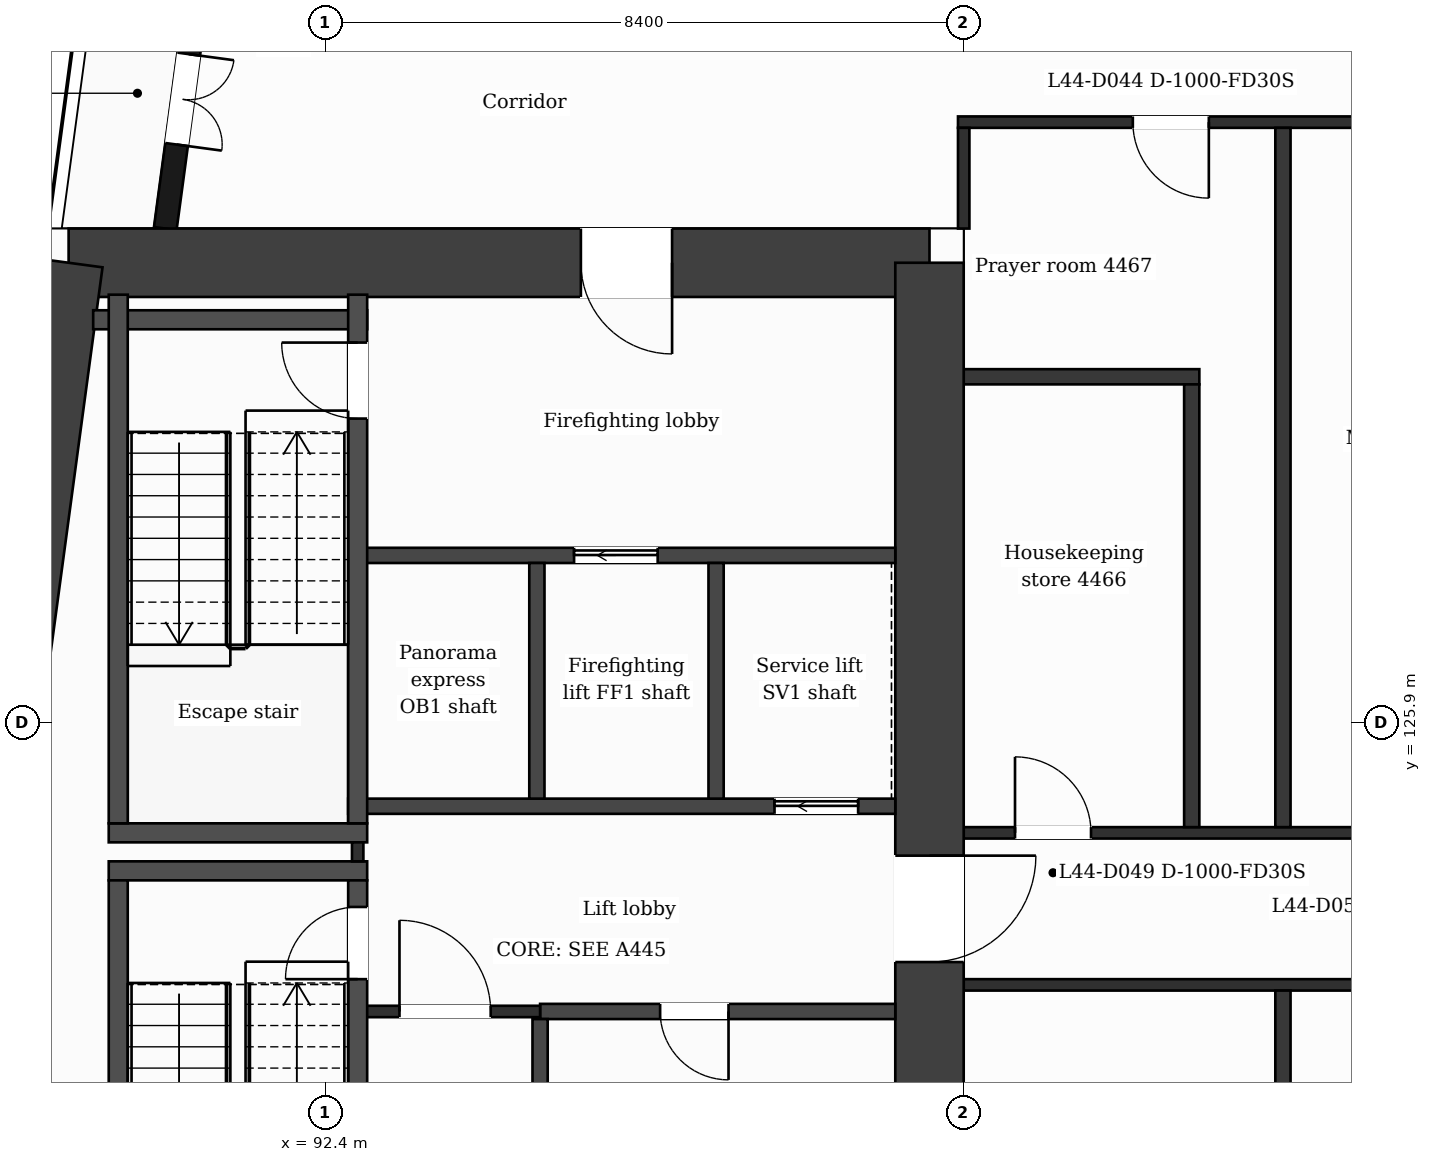
"""IFC4 building model, lengths in metres.
Left out: names, types, materials, properties, quantities, classifications, styles, units other than length and angle.
Written with IfcOpenShell. Run it as: python <this file> out.ifc"""

import sys

from ifc_helpers import new_model, si_unit, direction, frame, frame_2d, origin, place, context, subcontext, project, spatial, rectangle, extrude, element, fill, save


model = new_model("IFC4")
c1 = context("Model", 3, precision=1e-05, world=origin(), true_north=direction((0.0, 1.0)))
c2 = subcontext(c1, "Body", "Model", "MODEL_VIEW")
j1 = project(units=[si_unit("LENGTHUNIT", "METRE"), si_unit("PLANEANGLEUNIT", "RADIAN")], contexts=[c1])
p1 = place(None, origin())
s1 = spatial("IfcSite", under=j1, at=p1, CompositionType="ELEMENT")
p2 = place(p1, origin())
s2 = spatial("IfcBuilding", under=s1, at=p2, CompositionType="ELEMENT")
p3 = place(p2, frame((0.0, 0.0, 184.8)))
s3 = spatial("IfcBuildingStorey", under=s2, at=p3, CompositionType="ELEMENT", Elevation=184.8)
p4 = place(p3, frame((89.024, 131.95, 0.0), z_axis=(0.0, 0.0, 1.0), x_axis=(1.0, 0.0, 0.0)))
e1 = element("IfcWall", 1, at=p4, inside=s3, PredefinedType="SHEAR", context=c2, shape_type="SweptSolid", body=[
    extrude(rectangle(XDim=11.326, YDim=0.9, at=frame_2d((5.663, 0.0))), origin(), (0.0, 0.0, 1.0), 3.7),
])
p5 = place(p4, frame((6.739, 0.0, 0.0)))
e2 = element("IfcOpeningElement", 2, at=p5, cuts=e1, PredefinedType="OPENING", context=c2, shape_type="SweptSolid", body=[
    extrude(rectangle(XDim=1.2, YDim=2.1, at=frame_2d((0.6, 1.05))), frame((0.0, 0.46, 0.0), z_axis=(0.0, -1.0, 0.0), x_axis=(1.0, 0.0, 0.0)), (0.0, 0.0, 1.0), 0.92),
])
p6 = place(p3, frame((100.35, 131.95, 0.0), z_axis=(0.0, 0.0, 1.0), x_axis=(0.0, -1.0, 0.0)))
e3 = element("IfcWall", 3, at=p6, inside=s3, PredefinedType="SHEAR", context=c2, shape_type="SweptSolid", body=[
    extrude(rectangle(XDim=21.1, YDim=0.9, at=frame_2d((10.55, 0.0))), origin(), (0.0, 0.0, 1.0), 3.7),
])
p7 = place(p6, frame((7.8, 0.0, 0.0)))
e4 = element("IfcOpeningElement", 4, at=p7, cuts=e3, PredefinedType="OPENING", context=c2, shape_type="SweptSolid", body=[
    extrude(rectangle(XDim=1.4, YDim=2.1, at=frame_2d((0.7, 1.05))), frame((0.0, 0.46, 0.0), z_axis=(0.0, -1.0, 0.0), x_axis=(1.0, 0.0, 0.0)), (0.0, 0.0, 1.0), 0.92),
])
p8 = place(p3, frame((86.184, 110.85, 0.0), z_axis=(0.0, 0.0, 1.0), x_axis=(0.133410495943, 0.991060865725, 0.0)))
e5 = element("IfcWall", 5, at=p8, inside=s3, PredefinedType="SHEAR", context=c2, shape_type="SweptSolid", body=[
    extrude(rectangle(XDim=21.29, YDim=0.9, at=frame_2d((10.645, 0.0))), origin(), (0.0, 0.0, 1.0), 3.7),
])
p9 = place(p3, frame((91.177, 138.95, 0.0), z_axis=(0.0, 0.0, 1.0), x_axis=(-0.133426664613, -0.991058689065, 0.0)))
e6 = element("IfcWall", 6, at=p9, inside=s3, PredefinedType="SOLIDWALL", context=c2, shape_type="SweptSolid", body=[
    extrude(rectangle(XDim=6.609, YDim=0.3, at=frame_2d((3.305, 0.0))), origin(), (0.0, 0.0, 1.0), 3.38),
])
p10 = place(p9, frame((1.039, 0.0, 0.9)))
e7 = element("IfcOpeningElement", 7, at=p10, cuts=e6, PredefinedType="OPENING", context=c2, shape_type="SweptSolid", body=[
    extrude(rectangle(XDim=1.2, YDim=2.1, at=frame_2d((0.6, 1.05))), frame((0.0, 0.16, 0.0), z_axis=(0.0, -1.0, 0.0), x_axis=(1.0, 0.0, 0.0)), (0.0, 0.0, 1.0), 0.32),
])
p11 = place(p9, frame((4.294, 0.0, 0.0)))
e8 = element("IfcOpeningElement", 8, at=p11, cuts=e6, PredefinedType="OPENING", context=c2, shape_type="SweptSolid", body=[
    extrude(rectangle(XDim=1.2, YDim=2.4, at=frame_2d((0.6, 1.2))), frame((0.0, 0.16, 0.0), z_axis=(0.0, -1.0, 0.0), x_axis=(1.0, 0.0, 0.0)), (0.0, 0.0, 1.0), 0.32),
])
p12 = place(p3, frame((95.227, 122.1, 0.0), z_axis=(0.0, 0.0, 1.0), x_axis=(1.0, 0.0, 0.0)))
e9 = element("IfcWall", 9, at=p12, inside=s3, PredefinedType="PARTITIONING", context=c2, shape_type="SweptSolid", body=[
    extrude(rectangle(XDim=4.673, YDim=0.2, at=frame_2d((2.336, 0.0))), origin(), (0.0, 0.0, 1.0), 3.38),
])
p13 = place(p12, frame((1.579, 0.0, 0.0)))
e10 = element("IfcOpeningElement", 10, at=p13, cuts=e9, PredefinedType="OPENING", context=c2, shape_type="SweptSolid", body=[
    extrude(rectangle(XDim=0.9, YDim=2.1, at=frame_2d((0.45, 1.05))), frame((0.0, 0.11, 0.0), z_axis=(0.0, -1.0, 0.0), x_axis=(1.0, 0.0, 0.0)), (0.0, 0.0, 1.0), 0.22),
])
p14 = place(p3, frame((92.827, 122.1, 0.0), z_axis=(0.0, 0.0, 1.0), x_axis=(1.0, 0.0, 0.0)))
e11 = element("IfcWall", 11, at=p14, inside=s3, PredefinedType="PARTITIONING", context=c2, shape_type="SweptSolid", body=[
    extrude(rectangle(XDim=2.4, YDim=0.15, at=frame_2d((1.2, 0.0))), origin(), (0.0, 0.0, 1.0), 3.38),
])
p15 = place(p14, frame((0.55, 0.0, 0.0)))
e12 = element("IfcOpeningElement", 12, at=p15, cuts=e11, PredefinedType="OPENING", context=c2, shape_type="SweptSolid", body=[
    extrude(rectangle(XDim=1.2, YDim=2.1, at=frame_2d((0.6, 1.05))), frame((0.0, 0.085, 0.0), z_axis=(0.0, -1.0, 0.0), x_axis=(1.0, 0.0, 0.0)), (0.0, 0.0, 1.0), 0.17),
])
p16 = place(p3, frame((100.8, 122.45, 0.0), z_axis=(0.0, 0.0, 1.0), x_axis=(1.0, 0.0, 0.0)))
e13 = element("IfcWall", 13, at=p16, inside=s3, PredefinedType="PARTITIONING", context=c2, shape_type="SweptSolid", body=[
    extrude(rectangle(XDim=25.2, YDim=0.15, at=frame_2d((12.6, 0.0))), origin(), (0.0, 0.0, 1.0), 3.38),
])
for number, where, z_axis, x_axis in (
    (14, (89.552, 123.95, 0.0), (0.0, 0.0, 1.0), (1.0, 0.0, 0.0)),
    (15, (89.552, 124.45, 0.0), (0.0, 0.0, 1.0), (1.0, 0.0, 0.0)),
):
    element("IfcWall", number, at=place(p3, frame(where, z_axis=z_axis, x_axis=x_axis)), inside=s3, PredefinedType="PARTITIONING", context=c2, shape_type="SweptSolid", body=[
        extrude(rectangle(XDim=3.4, YDim=0.25, at=frame_2d((1.7, 0.0))), origin(), (0.0, 0.0, 1.0), 3.38),
    ])
p17 = place(p3, frame((100.8, 124.45, 0.0), z_axis=(0.0, 0.0, 1.0), x_axis=(1.0, 0.0, 0.0)))
e16 = element("IfcWall", 16, at=p17, inside=s3, PredefinedType="PARTITIONING", context=c2, shape_type="SweptSolid", body=[
    extrude(rectangle(XDim=25.2, YDim=0.15, at=frame_2d((12.6, 0.0))), origin(), (0.0, 0.0, 1.0), 3.38),
])
p18 = place(p17, frame((0.675, 0.0, 0.0)))
e17 = element("IfcOpeningElement", 17, at=p18, cuts=e16, PredefinedType="OPENING", context=c2, shape_type="SweptSolid", body=[
    extrude(rectangle(XDim=1.0, YDim=2.1, at=frame_2d((0.5, 1.05))), frame((0.0, 0.085, 0.0), z_axis=(0.0, -1.0, 0.0), x_axis=(1.0, 0.0, 0.0)), (0.0, 0.0, 1.0), 0.17),
])
p19 = place(p17, frame((5.175, 0.0, 0.0)))
e18 = element("IfcOpeningElement", 18, at=p19, cuts=e16, PredefinedType="OPENING", context=c2, shape_type="SweptSolid", body=[
    extrude(rectangle(XDim=1.0, YDim=2.1, at=frame_2d((0.5, 1.05))), frame((0.0, 0.085, 0.0), z_axis=(0.0, -1.0, 0.0), x_axis=(1.0, 0.0, 0.0)), (0.0, 0.0, 1.0), 0.17),
])
p20 = place(p17, frame((10.425, 0.0, 0.0)))
e19 = element("IfcOpeningElement", 19, at=p20, cuts=e16, PredefinedType="OPENING", context=c2, shape_type="SweptSolid", body=[
    extrude(rectangle(XDim=1.0, YDim=2.1, at=frame_2d((0.5, 1.05))), frame((0.0, 0.085, 0.0), z_axis=(0.0, -1.0, 0.0), x_axis=(1.0, 0.0, 0.0)), (0.0, 0.0, 1.0), 0.17),
])
p21 = place(p17, frame((22.175, 0.0, 0.0)))
e20 = element("IfcOpeningElement", 20, at=p21, cuts=e16, PredefinedType="OPENING", context=c2, shape_type="SweptSolid", body=[
    extrude(rectangle(XDim=1.0, YDim=2.1, at=frame_2d((0.5, 1.05))), frame((0.0, 0.085, 0.0), z_axis=(0.0, -1.0, 0.0), x_axis=(1.0, 0.0, 0.0)), (0.0, 0.0, 1.0), 0.17),
])
p22 = place(p3, frame((92.702, 124.8, 0.0), z_axis=(0.0, 0.0, 1.0), x_axis=(1.0, 0.0, 0.0)))
e21 = element("IfcWall", 21, at=p22, inside=s3, PredefinedType="PARTITIONING", context=c2, shape_type="SweptSolid", body=[
    extrude(rectangle(XDim=7.198, YDim=0.2, at=frame_2d((3.599, 0.0))), origin(), (0.0, 0.0, 1.0), 3.38),
])
p23 = place(p22, frame((5.609, 0.0, 0.0)))
e22 = element("IfcOpeningElement", 22, at=p23, cuts=e21, PredefinedType="OPENING", context=c2, shape_type="SweptSolid", body=[
    extrude(rectangle(XDim=1.1, YDim=2.1, at=frame_2d((0.55, 1.05))), frame((0.0, 0.11, 0.0), z_axis=(0.0, -1.0, 0.0), x_axis=(1.0, 0.0, 0.0)), (0.0, 0.0, 1.0), 0.22),
])
p24 = place(p3, frame((92.827, 128.1, 0.0), z_axis=(0.0, 0.0, 1.0), x_axis=(1.0, 0.0, 0.0)))
e23 = element("IfcWall", 23, at=p24, inside=s3, PredefinedType="PARTITIONING", context=c2, shape_type="SweptSolid", body=[
    extrude(rectangle(XDim=7.073, YDim=0.2, at=frame_2d((3.537, 0.0))), origin(), (0.0, 0.0, 1.0), 3.38),
])
p25 = place(p24, frame((2.847, 0.0, 0.0)))
e24 = element("IfcOpeningElement", 24, at=p25, cuts=e23, PredefinedType="OPENING", context=c2, shape_type="SweptSolid", body=[
    extrude(rectangle(XDim=1.1, YDim=2.1, at=frame_2d((0.55, 1.05))), frame((0.0, 0.11, 0.0), z_axis=(0.0, -1.0, 0.0), x_axis=(1.0, 0.0, 0.0)), (0.0, 0.0, 1.0), 0.22),
])
p26 = place(p3, frame((100.8, 130.45, 0.0), z_axis=(0.0, 0.0, 1.0), x_axis=(1.0, 0.0, 0.0)))
e25 = element("IfcWall", 25, at=p26, inside=s3, PredefinedType="PARTITIONING", context=c2, shape_type="SweptSolid", body=[
    extrude(rectangle(XDim=3.1, YDim=0.2, at=frame_2d((1.55, 0.0))), origin(), (0.0, 0.0, 1.0), 3.38),
])
p27 = place(p3, frame((89.347, 131.2, 0.0), z_axis=(0.0, 0.0, 1.0), x_axis=(1.0, 0.0, 0.0)))
e26 = element("IfcWall", 26, at=p27, inside=s3, PredefinedType="PARTITIONING", context=c2, shape_type="SweptSolid", body=[
    extrude(rectangle(XDim=3.604, YDim=0.25, at=frame_2d((1.802, 0.0))), origin(), (0.0, 0.0, 1.0), 3.38),
])
p28 = place(p3, frame((100.725, 133.8, 0.0), z_axis=(0.0, 0.0, 1.0), x_axis=(1.0, 0.0, 0.0)))
e27 = element("IfcWall", 27, at=p28, inside=s3, PredefinedType="PARTITIONING", context=c2, shape_type="SweptSolid", body=[
    extrude(rectangle(XDim=25.35, YDim=0.15, at=frame_2d((12.675, 0.0))), origin(), (0.0, 0.0, 1.0), 3.38),
])
p29 = place(p28, frame((2.3, 0.0, 0.0)))
e28 = element("IfcOpeningElement", 28, at=p29, cuts=e27, PredefinedType="OPENING", context=c2, shape_type="SweptSolid", body=[
    extrude(rectangle(XDim=1.0, YDim=2.1, at=frame_2d((0.5, 1.05))), frame((0.0, 0.085, 0.0), z_axis=(0.0, -1.0, 0.0), x_axis=(1.0, 0.0, 0.0)), (0.0, 0.0, 1.0), 0.17),
])
p30 = place(p3, frame((89.677, 116.87, 0.0), z_axis=(0.0, 0.0, 1.0), x_axis=(0.0, 1.0, 0.0)))
e29 = element("IfcWall", 29, at=p30, inside=s3, PredefinedType="PARTITIONING", context=c2, shape_type="SweptSolid", body=[
    extrude(rectangle(XDim=6.955, YDim=0.25, at=frame_2d((3.478, 0.0))), origin(), (0.0, 0.0, 1.0), 3.38),
])
p31 = place(p3, frame((89.677, 124.575, 0.0), z_axis=(0.0, 0.0, 1.0), x_axis=(0.0, 1.0, 0.0)))
e30 = element("IfcWall", 30, at=p31, inside=s3, PredefinedType="PARTITIONING", context=c2, shape_type="SweptSolid", body=[
    extrude(rectangle(XDim=6.955, YDim=0.25, at=frame_2d((3.478, 0.0))), origin(), (0.0, 0.0, 1.0), 3.38),
])
p32 = place(p3, frame((92.827, 124.075, 0.0), z_axis=(0.0, 0.0, 1.0), x_axis=(0.0, 1.0, 0.0)))
e31 = element("IfcWall", 31, at=p32, inside=s3, PredefinedType="PARTITIONING", context=c2, shape_type="SweptSolid", body=[
    extrude(rectangle(XDim=0.25, YDim=0.15, at=frame_2d((0.125, 0.0))), origin(), (0.0, 0.0, 1.0), 3.38),
])
p33 = place(p3, frame((92.827, 116.87, 0.0), z_axis=(0.0, 0.0, 1.0), x_axis=(0.0, 1.0, 0.0)))
e32 = element("IfcWall", 32, at=p33, inside=s3, PredefinedType="PARTITIONING", context=c2, shape_type="SweptSolid", body=[
    extrude(rectangle(XDim=6.955, YDim=0.25, at=frame_2d((3.478, 0.0))), origin(), (0.0, 0.0, 1.0), 3.38),
])
p34 = place(p33, frame((5.655, 0.0, 0.0)))
e33 = element("IfcOpeningElement", 33, at=p34, cuts=e32, PredefinedType="OPENING", context=c2, shape_type="SweptSolid", body=[
    extrude(rectangle(XDim=0.95, YDim=2.1, at=frame_2d((0.475, 1.05))), frame((0.0, 0.135, 0.0), z_axis=(0.0, -1.0, 0.0), x_axis=(1.0, 0.0, 0.0)), (0.0, 0.0, 1.0), 0.27),
])
p35 = place(p3, frame((92.827, 124.575, 0.0), z_axis=(0.0, 0.0, 1.0), x_axis=(0.0, 1.0, 0.0)))
e34 = element("IfcWall", 34, at=p35, inside=s3, PredefinedType="PARTITIONING", context=c2, shape_type="SweptSolid", body=[
    extrude(rectangle(XDim=6.955, YDim=0.25, at=frame_2d((3.478, 0.0))), origin(), (0.0, 0.0, 1.0), 3.38),
])
p36 = place(p35, frame((5.325, 0.0, 0.0)))
e35 = element("IfcOpeningElement", 35, at=p36, cuts=e34, PredefinedType="OPENING", context=c2, shape_type="SweptSolid", body=[
    extrude(rectangle(XDim=1.0, YDim=2.1, at=frame_2d((0.5, 1.05))), frame((0.0, 0.135, 0.0), z_axis=(0.0, -1.0, 0.0), x_axis=(1.0, 0.0, 0.0)), (0.0, 0.0, 1.0), 0.27),
])
p37 = place(p3, frame((95.185, 124.9, 0.0), z_axis=(0.0, 0.0, 1.0), x_axis=(0.0, 1.0, 0.0)))
e36 = element("IfcWall", 36, at=p37, inside=s3, PredefinedType="PARTITIONING", context=c2, shape_type="SweptSolid", body=[
    extrude(rectangle(XDim=3.1, YDim=0.2, at=frame_2d((1.55, 0.0))), origin(), (0.0, 0.0, 1.0), 3.38),
])
p38 = place(p3, frame((95.227, 116.87, 0.0), z_axis=(0.0, 0.0, 1.0), x_axis=(0.0, 1.0, 0.0)))
e37 = element("IfcWall", 37, at=p38, inside=s3, PredefinedType="PARTITIONING", context=c2, shape_type="SweptSolid", body=[
    extrude(rectangle(XDim=5.13, YDim=0.2, at=frame_2d((2.565, 0.0))), origin(), (0.0, 0.0, 1.0), 3.38),
])
p39 = place(p38, frame((0.68, 0.0, 0.0)))
e38 = element("IfcOpeningElement", 38, at=p39, cuts=e37, PredefinedType="OPENING", context=c2, shape_type="SweptSolid", body=[
    extrude(rectangle(XDim=0.9, YDim=2.1, at=frame_2d((0.45, 1.05))), frame((0.0, 0.11, 0.0), z_axis=(0.0, -1.0, 0.0), x_axis=(1.0, 0.0, 0.0)), (0.0, 0.0, 1.0), 0.22),
])
p40 = place(p3, frame((97.542, 124.9, 0.0), z_axis=(0.0, 0.0, 1.0), x_axis=(0.0, 1.0, 0.0)))
e39 = element("IfcWall", 39, at=p40, inside=s3, PredefinedType="PARTITIONING", context=c2, shape_type="SweptSolid", body=[
    extrude(rectangle(XDim=3.1, YDim=0.2, at=frame_2d((1.55, 0.0))), origin(), (0.0, 0.0, 1.0), 3.38),
])
p41 = place(p3, frame((100.8, 132.4, 0.0), z_axis=(0.0, 0.0, 1.0), x_axis=(0.0, 1.0, 0.0)))
e40 = element("IfcWall", 40, at=p41, inside=s3, PredefinedType="PARTITIONING", context=c2, shape_type="SweptSolid", body=[
    extrude(rectangle(XDim=1.325, YDim=0.15, at=frame_2d((0.663, 0.0))), origin(), (0.0, 0.0, 1.0), 3.38),
])
p42 = place(p3, frame((103.8, 124.525, 0.0), z_axis=(0.0, 0.0, 1.0), x_axis=(0.0, 1.0, 0.0)))
e41 = element("IfcWall", 41, at=p42, inside=s3, PredefinedType="PARTITIONING", context=c2, shape_type="SweptSolid", body=[
    extrude(rectangle(XDim=5.825, YDim=0.2, at=frame_2d((2.913, 0.0))), origin(), (0.0, 0.0, 1.0), 3.38),
])
p43 = place(p3, frame((105.0, 109.075, 0.0), z_axis=(0.0, 0.0, 1.0), x_axis=(0.0, 1.0, 0.0)))
e42 = element("IfcWall", 42, at=p43, inside=s3, PredefinedType="PARTITIONING", context=c2, shape_type="SweptSolid", body=[
    extrude(rectangle(XDim=13.3, YDim=0.2, at=frame_2d((6.65, 0.0))), origin(), (0.0, 0.0, 1.0), 3.38),
])
p44 = place(p3, frame((105.0, 124.525, 0.0), z_axis=(0.0, 0.0, 1.0), x_axis=(0.0, 1.0, 0.0)))
e43 = element("IfcWall", 43, at=p44, inside=s3, PredefinedType="PARTITIONING", context=c2, shape_type="SweptSolid", body=[
    extrude(rectangle(XDim=9.2, YDim=0.2, at=frame_2d((4.6, 0.0))), origin(), (0.0, 0.0, 1.0), 3.38),
])
p45 = place(p11, origin())
e44 = element("IfcDoor", 44, at=p45, inside=s3, OperationType="DOUBLE_DOOR_SINGLE_SWING", PredefinedType="DOOR", context=c2, shape_type="SweptSolid", body=[
    extrude(rectangle(XDim=1.2, YDim=2.4, at=frame_2d((0.6, 1.2))), frame((0.0, 0.025, 0.0), z_axis=(0.0, -1.0, 0.0), x_axis=(1.0, 0.0, 0.0)), (0.0, 0.0, 1.0), 0.05),
])
fill(e8, e44)
p46 = place(p15, origin())
e45 = element("IfcDoor", 45, at=p46, inside=s3, OperationType="SINGLE_SWING_LEFT", PredefinedType="DOOR", context=c2, shape_type="SweptSolid", body=[
    extrude(rectangle(XDim=1.2, YDim=2.1, at=frame_2d((0.6, 1.05))), frame((0.0, 0.025, 0.0), z_axis=(0.0, -1.0, 0.0), x_axis=(1.0, 0.0, 0.0)), (0.0, 0.0, 1.0), 0.05),
])
fill(e12, e45)
p47 = place(p25, origin())
e46 = element("IfcDoor", 46, at=p47, inside=s3, OperationType="SLIDING_TO_LEFT", PredefinedType="DOOR", context=c2, shape_type="SweptSolid", body=[
    extrude(rectangle(XDim=1.1, YDim=2.1, at=frame_2d((0.55, 1.05))), frame((0.0, 0.025, 0.0), z_axis=(0.0, -1.0, 0.0), x_axis=(1.0, 0.0, 0.0)), (0.0, 0.0, 1.0), 0.05),
])
fill(e24, e46)
p48 = place(p23, origin())
e47 = element("IfcDoor", 47, at=p48, inside=s3, OperationType="SLIDING_TO_LEFT", PredefinedType="DOOR", context=c2, shape_type="SweptSolid", body=[
    extrude(rectangle(XDim=1.1, YDim=2.1, at=frame_2d((0.55, 1.05))), frame((0.0, 0.025, 0.0), z_axis=(0.0, -1.0, 0.0), x_axis=(1.0, 0.0, 0.0)), (0.0, 0.0, 1.0), 0.05),
])
fill(e22, e47)
p49 = place(p13, origin())
e48 = element("IfcDoor", 48, at=p49, inside=s3, OperationType="SINGLE_SWING_RIGHT", PredefinedType="DOOR", context=c2, shape_type="SweptSolid", body=[
    extrude(rectangle(XDim=0.9, YDim=2.1, at=frame_2d((0.45, 1.05))), frame((0.0, 0.025, 0.0), z_axis=(0.0, -1.0, 0.0), x_axis=(1.0, 0.0, 0.0)), (0.0, 0.0, 1.0), 0.05),
])
fill(e10, e48)
p50 = place(p34, origin())
e49 = element("IfcDoor", 49, at=p50, inside=s3, OperationType="SINGLE_SWING_LEFT", PredefinedType="DOOR", context=c2, shape_type="SweptSolid", body=[
    extrude(rectangle(XDim=0.95, YDim=2.1, at=frame_2d((0.475, 1.05))), frame((0.0, 0.025, 0.0), z_axis=(0.0, -1.0, 0.0), x_axis=(1.0, 0.0, 0.0)), (0.0, 0.0, 1.0), 0.05),
])
fill(e33, e49)
p51 = place(p36, origin())
e50 = element("IfcDoor", 50, at=p51, inside=s3, OperationType="SINGLE_SWING_RIGHT", PredefinedType="DOOR", context=c2, shape_type="SweptSolid", body=[
    extrude(rectangle(XDim=1.0, YDim=2.1, at=frame_2d((0.5, 1.05))), frame((0.0, 0.025, 0.0), z_axis=(0.0, -1.0, 0.0), x_axis=(1.0, 0.0, 0.0)), (0.0, 0.0, 1.0), 0.05),
])
fill(e35, e50)
p52 = place(p29, origin())
e51 = element("IfcDoor", 51, at=p52, inside=s3, OperationType="SINGLE_SWING_RIGHT", PredefinedType="DOOR", context=c2, shape_type="SweptSolid", body=[
    extrude(rectangle(XDim=1.0, YDim=2.1, at=frame_2d((0.5, 1.05))), frame((0.0, 0.025, 0.0), z_axis=(0.0, -1.0, 0.0), x_axis=(1.0, 0.0, 0.0)), (0.0, 0.0, 1.0), 0.05),
])
fill(e28, e51)
p53 = place(p18, origin())
e52 = element("IfcDoor", 52, at=p53, inside=s3, OperationType="SINGLE_SWING_LEFT", PredefinedType="DOOR", context=c2, shape_type="SweptSolid", body=[
    extrude(rectangle(XDim=1.0, YDim=2.1, at=frame_2d((0.5, 1.05))), frame((0.0, 0.025, 0.0), z_axis=(0.0, -1.0, 0.0), x_axis=(1.0, 0.0, 0.0)), (0.0, 0.0, 1.0), 0.05),
])
fill(e17, e52)
p54 = place(p5, origin())
e53 = element("IfcDoor", 53, at=p54, inside=s3, OperationType="SINGLE_SWING_RIGHT", PredefinedType="DOOR", context=c2, shape_type="SweptSolid", body=[
    extrude(rectangle(XDim=1.2, YDim=2.1, at=frame_2d((0.6, 1.05))), frame((0.0, 0.025, 0.0), z_axis=(0.0, -1.0, 0.0), x_axis=(1.0, 0.0, 0.0)), (0.0, 0.0, 1.0), 0.05),
])
fill(e2, e53)
p55 = place(p7, origin())
e54 = element("IfcDoor", 54, at=p55, inside=s3, OperationType="SINGLE_SWING_LEFT", PredefinedType="DOOR", context=c2, shape_type="SweptSolid", body=[
    extrude(rectangle(XDim=1.4, YDim=2.1, at=frame_2d((0.7, 1.05))), frame((0.0, 0.025, 0.0), z_axis=(0.0, -1.0, 0.0), x_axis=(1.0, 0.0, 0.0)), (0.0, 0.0, 1.0), 0.05),
])
fill(e4, e54)
save(model, sys.argv[1])
